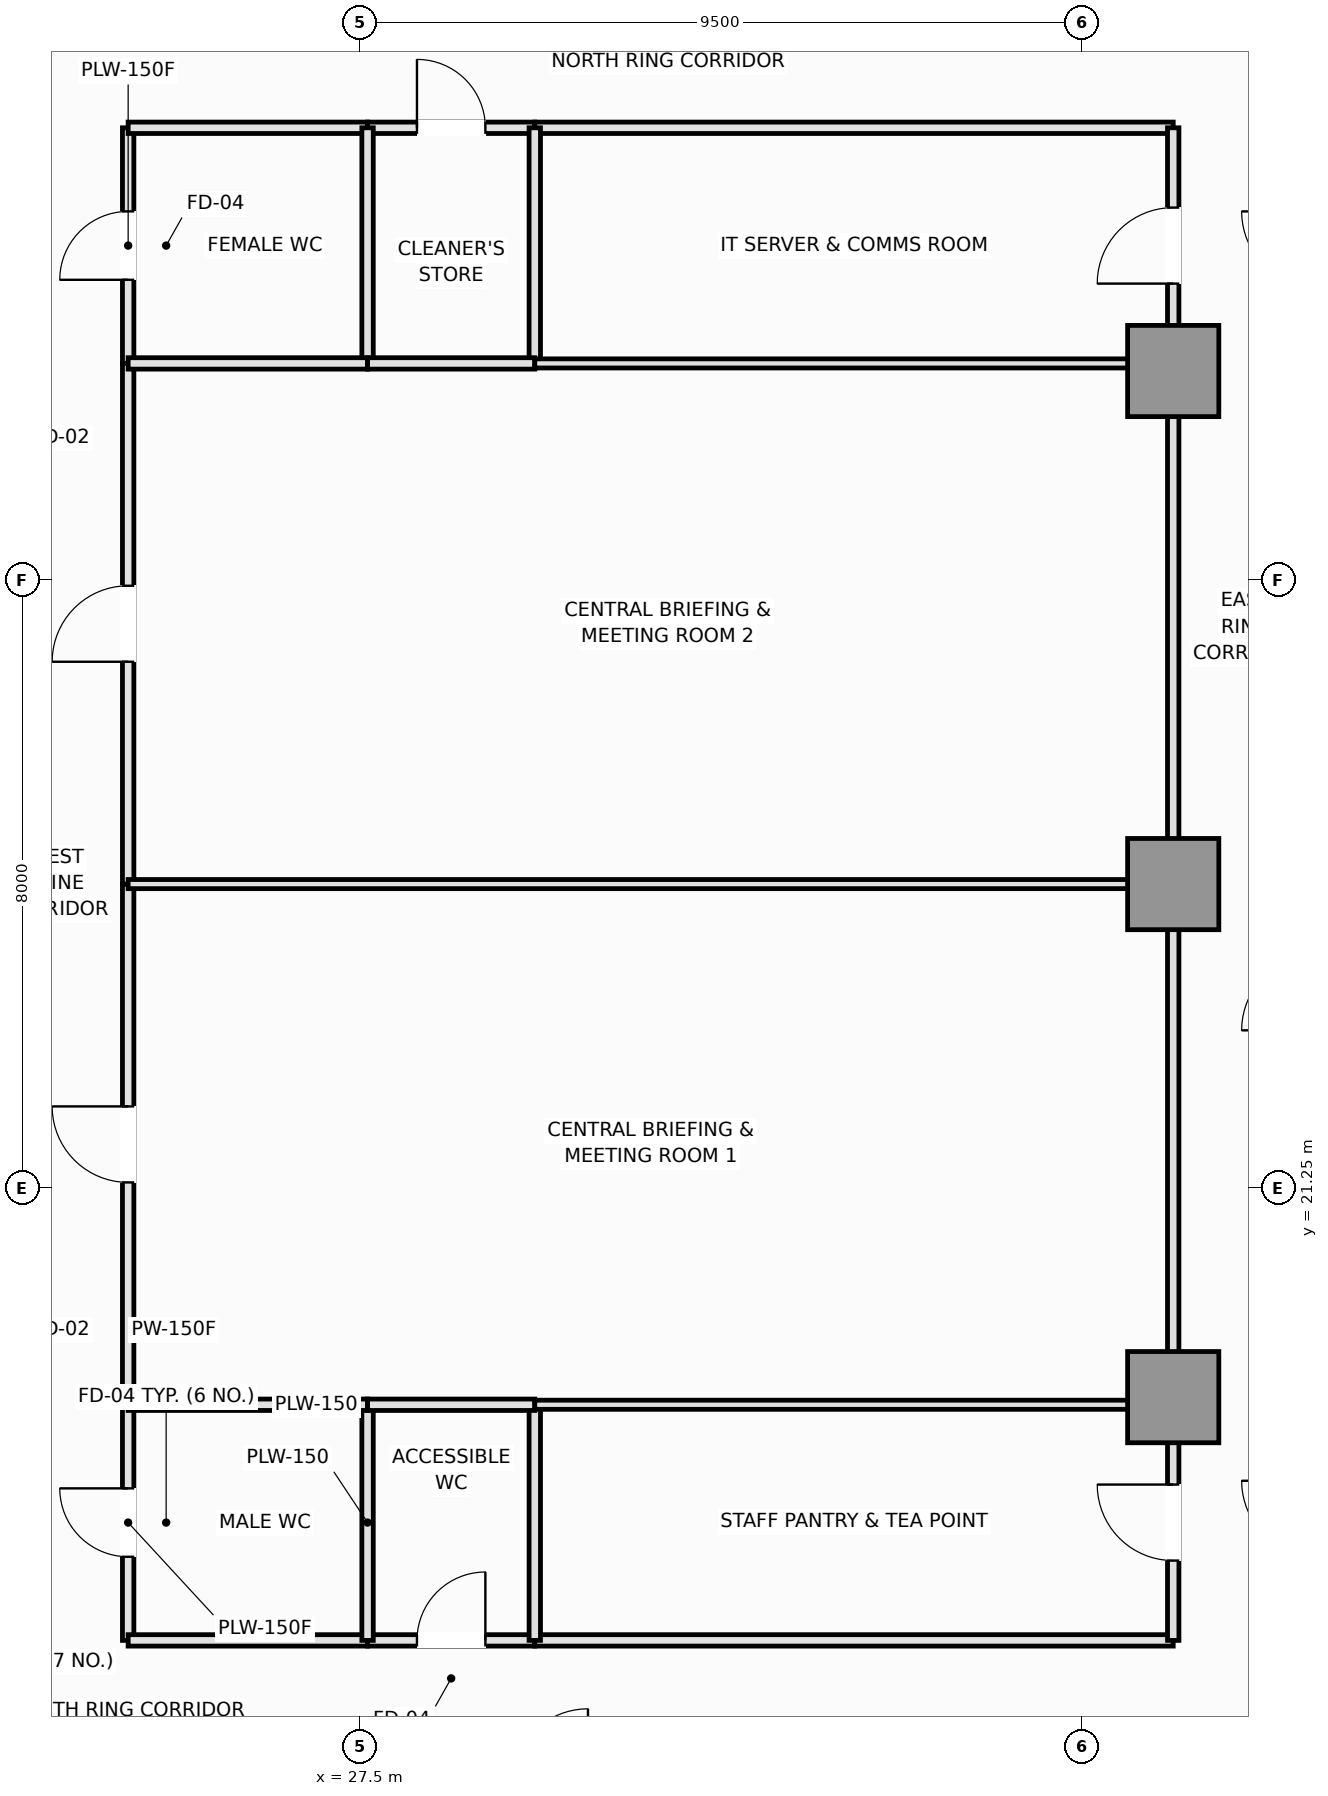
"""IFC4 building model, lengths in metres.
Left out: names, types, materials, properties, quantities, classifications, styles, units other than length and angle.
Written with IfcOpenShell. Run it as: python <this file> out.ifc"""

import sys

from ifc_helpers import new_model, si_unit, direction, frame, frame_2d, origin, origin_2d, place, context, subcontext, project, spatial, rectangle, extrude, element, fill, save


model = new_model("IFC4")
c1 = context("Model", 3, precision=1e-05, world=origin(), true_north=direction((0.0, 1.0)))
c2 = subcontext(c1, "Body", "Model", "MODEL_VIEW")
j1 = project(units=[si_unit("LENGTHUNIT", "METRE"), si_unit("PLANEANGLEUNIT", "RADIAN")], contexts=[c1])
p1 = place(None, origin())
s1 = spatial("IfcSite", under=j1, at=p1, CompositionType="ELEMENT")
p2 = place(p1, origin())
s2 = spatial("IfcBuilding", under=s1, at=p2, CompositionType="ELEMENT")
p3 = place(p2, frame((0.0, 0.0, 46.9)))
s3 = spatial("IfcBuildingStorey", under=s2, at=p3, CompositionType="ELEMENT", Elevation=46.9)
for number, where, z_axis, x_axis in (
    (1, (38.2, 18.5, 0.0), (0.0, 0.0, 1.0), (1.0, 0.0, 0.0)),
    (2, (38.2, 25.25, 0.0), (0.0, 0.0, 1.0), (1.0, 0.0, 0.0)),
    (3, (38.2, 32.0, 0.0), (0.0, 0.0, 1.0), (1.0, 0.0, 0.0)),
):
    element("IfcColumn", number, at=place(p3, frame(where, z_axis=z_axis, x_axis=x_axis)), inside=s3, PredefinedType="COLUMN", context=c2, shape_type="SweptSolid", body=[
        extrude(rectangle(XDim=1.2, YDim=1.2, at=origin_2d()), origin(), (0.0, 0.0, 1.0), 3.55),
    ])
p4 = place(p3, frame((24.45, 15.3, 0.0), z_axis=(0.0, 0.0, 1.0), x_axis=(0.0, 1.0, 0.0)))
e4 = element("IfcWall", 4, at=p4, inside=s3, PredefinedType="PLUMBINGWALL", context=c2, shape_type="SweptSolid", body=[
    extrude(rectangle(XDim=3.1, YDim=0.15, at=frame_2d((1.55, 0.0))), origin(), (0.0, 0.0, 1.0), 3.37),
])
p5 = place(p4, frame((1.1, 0.0, 0.0)))
e5 = element("IfcOpeningElement", 5, at=p5, cuts=e4, PredefinedType="OPENING", context=c2, shape_type="SweptSolid", body=[
    extrude(rectangle(XDim=0.9, YDim=2.1, at=frame_2d((0.45, 1.05))), frame((0.0, 0.085, 0.0), z_axis=(0.0, -1.0, 0.0), x_axis=(1.0, 0.0, 0.0)), (0.0, 0.0, 1.0), 0.17),
])
p6 = place(p3, frame((24.45, 32.1, 0.0), z_axis=(0.0, 0.0, 1.0), x_axis=(0.0, 1.0, 0.0)))
e6 = element("IfcWall", 6, at=p6, inside=s3, PredefinedType="PLUMBINGWALL", context=c2, shape_type="SweptSolid", body=[
    extrude(rectangle(XDim=3.1, YDim=0.15, at=frame_2d((1.55, 0.0))), origin(), (0.0, 0.0, 1.0), 3.37),
])
p7 = place(p6, frame((1.1, 0.0, 0.0)))
e7 = element("IfcOpeningElement", 7, at=p7, cuts=e6, PredefinedType="OPENING", context=c2, shape_type="SweptSolid", body=[
    extrude(rectangle(XDim=0.9, YDim=2.1, at=frame_2d((0.45, 1.05))), frame((0.0, 0.085, 0.0), z_axis=(0.0, -1.0, 0.0), x_axis=(1.0, 0.0, 0.0)), (0.0, 0.0, 1.0), 0.17),
])
p8 = place(p3, frame((24.45, 18.4, 0.0), z_axis=(0.0, 0.0, 1.0), x_axis=(0.0, 1.0, 0.0)))
e8 = element("IfcWall", 8, at=p8, inside=s3, PredefinedType="PARTITIONING", context=c2, shape_type="SweptSolid", body=[
    extrude(rectangle(XDim=6.85, YDim=0.15, at=frame_2d((3.425, 0.0))), origin(), (0.0, 0.0, 1.0), 3.37),
])
p9 = place(p8, frame((2.925, 0.0, 0.0)))
e9 = element("IfcOpeningElement", 9, at=p9, cuts=e8, PredefinedType="OPENING", context=c2, shape_type="SweptSolid", body=[
    extrude(rectangle(XDim=1.0, YDim=2.15, at=frame_2d((0.5, 1.075))), frame((0.0, 0.085, 0.0), z_axis=(0.0, -1.0, 0.0), x_axis=(1.0, 0.0, 0.0)), (0.0, 0.0, 1.0), 0.17),
])
p10 = place(p3, frame((24.45, 25.25, 0.0), z_axis=(0.0, 0.0, 1.0), x_axis=(0.0, 1.0, 0.0)))
e10 = element("IfcWall", 10, at=p10, inside=s3, PredefinedType="PARTITIONING", context=c2, shape_type="SweptSolid", body=[
    extrude(rectangle(XDim=6.85, YDim=0.15, at=frame_2d((3.425, 0.0))), origin(), (0.0, 0.0, 1.0), 3.37),
])
p11 = place(p10, frame((2.925, 0.0, 0.0)))
e11 = element("IfcOpeningElement", 11, at=p11, cuts=e10, PredefinedType="OPENING", context=c2, shape_type="SweptSolid", body=[
    extrude(rectangle(XDim=1.0, YDim=2.15, at=frame_2d((0.5, 1.075))), frame((0.0, 0.085, 0.0), z_axis=(0.0, -1.0, 0.0), x_axis=(1.0, 0.0, 0.0)), (0.0, 0.0, 1.0), 0.17),
])
p12 = place(p3, frame((24.45, 15.3, 0.0), z_axis=(0.0, 0.0, 1.0), x_axis=(1.0, 0.0, 0.0)))
e12 = element("IfcWall", 12, at=p12, inside=s3, PredefinedType="PLUMBINGWALL", context=c2, shape_type="SweptSolid", body=[
    extrude(rectangle(XDim=3.15, YDim=0.15, at=frame_2d((1.575, 0.0))), origin(), (0.0, 0.0, 1.0), 3.37),
])
p13 = place(p3, frame((27.6, 15.3, 0.0), z_axis=(0.0, 0.0, 1.0), x_axis=(1.0, 0.0, 0.0)))
e13 = element("IfcWall", 13, at=p13, inside=s3, PredefinedType="PLUMBINGWALL", context=c2, shape_type="SweptSolid", body=[
    extrude(rectangle(XDim=2.2, YDim=0.15, at=frame_2d((1.1, 0.0))), origin(), (0.0, 0.0, 1.0), 3.37),
])
p14 = place(p13, frame((0.65, 0.0, 0.0)))
e14 = element("IfcOpeningElement", 14, at=p14, cuts=e13, PredefinedType="OPENING", context=c2, shape_type="SweptSolid", body=[
    extrude(rectangle(XDim=0.9, YDim=2.1, at=frame_2d((0.45, 1.05))), frame((0.0, 0.085, 0.0), z_axis=(0.0, -1.0, 0.0), x_axis=(1.0, 0.0, 0.0)), (0.0, 0.0, 1.0), 0.17),
])
p15 = place(p3, frame((29.8, 15.3, 0.0), z_axis=(0.0, 0.0, 1.0), x_axis=(1.0, 0.0, 0.0)))
e15 = element("IfcWall", 15, at=p15, inside=s3, PredefinedType="PARTITIONING", context=c2, shape_type="SweptSolid", body=[
    extrude(rectangle(XDim=8.4, YDim=0.15, at=frame_2d((4.2, 0.0))), origin(), (0.0, 0.0, 1.0), 3.37),
])
p16 = place(p3, frame((24.45, 35.2, 0.0), z_axis=(0.0, 0.0, 1.0), x_axis=(1.0, 0.0, 0.0)))
e16 = element("IfcWall", 16, at=p16, inside=s3, PredefinedType="PLUMBINGWALL", context=c2, shape_type="SweptSolid", body=[
    extrude(rectangle(XDim=3.15, YDim=0.15, at=frame_2d((1.575, 0.0))), origin(), (0.0, 0.0, 1.0), 3.37),
])
p17 = place(p3, frame((27.6, 35.2, 0.0), z_axis=(0.0, 0.0, 1.0), x_axis=(1.0, 0.0, 0.0)))
e17 = element("IfcWall", 17, at=p17, inside=s3, PredefinedType="PLUMBINGWALL", context=c2, shape_type="SweptSolid", body=[
    extrude(rectangle(XDim=2.2, YDim=0.15, at=frame_2d((1.1, 0.0))), origin(), (0.0, 0.0, 1.0), 3.37),
])
p18 = place(p17, frame((0.65, 0.0, 0.0)))
e18 = element("IfcOpeningElement", 18, at=p18, cuts=e17, PredefinedType="OPENING", context=c2, shape_type="SweptSolid", body=[
    extrude(rectangle(XDim=0.9, YDim=2.1, at=frame_2d((0.45, 1.05))), frame((0.0, 0.085, 0.0), z_axis=(0.0, -1.0, 0.0), x_axis=(1.0, 0.0, 0.0)), (0.0, 0.0, 1.0), 0.17),
])
p19 = place(p3, frame((29.8, 35.2, 0.0), z_axis=(0.0, 0.0, 1.0), x_axis=(1.0, 0.0, 0.0)))
e19 = element("IfcWall", 19, at=p19, inside=s3, PredefinedType="PARTITIONING", context=c2, shape_type="SweptSolid", body=[
    extrude(rectangle(XDim=8.4, YDim=0.15, at=frame_2d((4.2, 0.0))), origin(), (0.0, 0.0, 1.0), 3.37),
])
p20 = place(p3, frame((38.2, 15.3, 0.0), z_axis=(0.0, 0.0, 1.0), x_axis=(0.0, 1.0, 0.0)))
e20 = element("IfcWall", 20, at=p20, inside=s3, PredefinedType="PARTITIONING", context=c2, shape_type="SweptSolid", body=[
    extrude(rectangle(XDim=3.1, YDim=0.15, at=frame_2d((1.55, 0.0))), origin(), (0.0, 0.0, 1.0), 2.82),
])
p21 = place(p20, frame((1.05, 0.0, 0.0)))
e21 = element("IfcOpeningElement", 21, at=p21, cuts=e20, PredefinedType="OPENING", context=c2, shape_type="SweptSolid", body=[
    extrude(rectangle(XDim=1.0, YDim=2.15, at=frame_2d((0.5, 1.075))), frame((0.0, 0.085, 0.0), z_axis=(0.0, -1.0, 0.0), x_axis=(1.0, 0.0, 0.0)), (0.0, 0.0, 1.0), 0.17),
])
p22 = place(p3, frame((38.2, 32.1, 0.0), z_axis=(0.0, 0.0, 1.0), x_axis=(0.0, 1.0, 0.0)))
e22 = element("IfcWall", 22, at=p22, inside=s3, PredefinedType="PARTITIONING", context=c2, shape_type="SweptSolid", body=[
    extrude(rectangle(XDim=3.1, YDim=0.15, at=frame_2d((1.55, 0.0))), origin(), (0.0, 0.0, 1.0), 2.82),
])
p23 = place(p22, frame((1.05, 0.0, 0.0)))
e23 = element("IfcOpeningElement", 23, at=p23, cuts=e22, PredefinedType="OPENING", context=c2, shape_type="SweptSolid", body=[
    extrude(rectangle(XDim=1.0, YDim=2.15, at=frame_2d((0.5, 1.075))), frame((0.0, 0.085, 0.0), z_axis=(0.0, -1.0, 0.0), x_axis=(1.0, 0.0, 0.0)), (0.0, 0.0, 1.0), 0.17),
])
for number, where, z_axis, x_axis in (
    (24, (38.2, 18.4, 0.0), (0.0, 0.0, 1.0), (0.0, 1.0, 0.0)),
    (25, (38.2, 25.25, 0.0), (0.0, 0.0, 1.0), (0.0, 1.0, 0.0)),
):
    element("IfcWall", number, at=place(p3, frame(where, z_axis=z_axis, x_axis=x_axis)), inside=s3, PredefinedType="PARTITIONING", context=c2, shape_type="SweptSolid", body=[
        extrude(rectangle(XDim=6.85, YDim=0.15, at=frame_2d((3.425, 0.0))), origin(), (0.0, 0.0, 1.0), 2.82),
    ])
p24 = place(p3, frame((27.6, 15.3, 0.0), z_axis=(0.0, 0.0, 1.0), x_axis=(0.0, 1.0, 0.0)))
e26 = element("IfcWall", 26, at=p24, inside=s3, PredefinedType="PLUMBINGWALL", context=c2, shape_type="SweptSolid", body=[
    extrude(rectangle(XDim=3.1, YDim=0.15, at=frame_2d((1.55, 0.0))), origin(), (0.0, 0.0, 1.0), 3.37),
])
p25 = place(p3, frame((24.45, 18.4, 0.0), z_axis=(0.0, 0.0, 1.0), x_axis=(1.0, 0.0, 0.0)))
e27 = element("IfcWall", 27, at=p25, inside=s3, PredefinedType="PLUMBINGWALL", context=c2, shape_type="SweptSolid", body=[
    extrude(rectangle(XDim=3.15, YDim=0.15, at=frame_2d((1.575, 0.0))), origin(), (0.0, 0.0, 1.0), 2.72),
])
p26 = place(p3, frame((27.6, 32.1, 0.0), z_axis=(0.0, 0.0, 1.0), x_axis=(0.0, 1.0, 0.0)))
e28 = element("IfcWall", 28, at=p26, inside=s3, PredefinedType="PLUMBINGWALL", context=c2, shape_type="SweptSolid", body=[
    extrude(rectangle(XDim=3.1, YDim=0.15, at=frame_2d((1.55, 0.0))), origin(), (0.0, 0.0, 1.0), 3.37),
])
p27 = place(p3, frame((24.45, 32.1, 0.0), z_axis=(0.0, 0.0, 1.0), x_axis=(1.0, 0.0, 0.0)))
e29 = element("IfcWall", 29, at=p27, inside=s3, PredefinedType="PLUMBINGWALL", context=c2, shape_type="SweptSolid", body=[
    extrude(rectangle(XDim=3.15, YDim=0.15, at=frame_2d((1.575, 0.0))), origin(), (0.0, 0.0, 1.0), 2.72),
])
p28 = place(p3, frame((29.8, 15.3, 0.0), z_axis=(0.0, 0.0, 1.0), x_axis=(0.0, 1.0, 0.0)))
e30 = element("IfcWall", 30, at=p28, inside=s3, PredefinedType="PLUMBINGWALL", context=c2, shape_type="SweptSolid", body=[
    extrude(rectangle(XDim=3.1, YDim=0.15, at=frame_2d((1.55, 0.0))), origin(), (0.0, 0.0, 1.0), 3.37),
])
p29 = place(p3, frame((27.6, 18.4, 0.0), z_axis=(0.0, 0.0, 1.0), x_axis=(1.0, 0.0, 0.0)))
e31 = element("IfcWall", 31, at=p29, inside=s3, PredefinedType="PLUMBINGWALL", context=c2, shape_type="SweptSolid", body=[
    extrude(rectangle(XDim=2.2, YDim=0.15, at=frame_2d((1.1, 0.0))), origin(), (0.0, 0.0, 1.0), 2.72),
])
p30 = place(p3, frame((29.8, 32.1, 0.0), z_axis=(0.0, 0.0, 1.0), x_axis=(0.0, 1.0, 0.0)))
e32 = element("IfcWall", 32, at=p30, inside=s3, PredefinedType="PLUMBINGWALL", context=c2, shape_type="SweptSolid", body=[
    extrude(rectangle(XDim=3.1, YDim=0.15, at=frame_2d((1.55, 0.0))), origin(), (0.0, 0.0, 1.0), 3.37),
])
p31 = place(p3, frame((27.6, 32.1, 0.0), z_axis=(0.0, 0.0, 1.0), x_axis=(1.0, 0.0, 0.0)))
e33 = element("IfcWall", 33, at=p31, inside=s3, PredefinedType="PLUMBINGWALL", context=c2, shape_type="SweptSolid", body=[
    extrude(rectangle(XDim=2.2, YDim=0.15, at=frame_2d((1.1, 0.0))), origin(), (0.0, 0.0, 1.0), 2.72),
])
for number, where, z_axis, x_axis in (
    (34, (29.8, 18.4, 0.0), (0.0, 0.0, 1.0), (1.0, 0.0, 0.0)),
    (35, (29.8, 32.1, 0.0), (0.0, 0.0, 1.0), (1.0, 0.0, 0.0)),
):
    element("IfcWall", number, at=place(p3, frame(where, z_axis=z_axis, x_axis=x_axis)), inside=s3, PredefinedType="PARTITIONING", context=c2, shape_type="SweptSolid", body=[
        extrude(rectangle(XDim=8.4, YDim=0.12, at=frame_2d((4.2, 0.0))), origin(), (0.0, 0.0, 1.0), 2.72),
    ])
p32 = place(p3, frame((24.45, 25.25, 0.0), z_axis=(0.0, 0.0, 1.0), x_axis=(1.0, 0.0, 0.0)))
e36 = element("IfcWall", 36, at=p32, inside=s3, PredefinedType="PARTITIONING", context=c2, shape_type="SweptSolid", body=[
    extrude(rectangle(XDim=13.75, YDim=0.12, at=frame_2d((6.875, 0.0))), origin(), (0.0, 0.0, 1.0), 2.72),
])
p33 = place(p5, origin())
e37 = element("IfcDoor", 37, at=p33, inside=s3, OperationType="SINGLE_SWING_RIGHT", PredefinedType="DOOR", context=c2, shape_type="SweptSolid", body=[
    extrude(rectangle(XDim=0.9, YDim=2.1, at=frame_2d((0.45, 1.05))), frame((0.0, 0.025, 0.0), z_axis=(0.0, -1.0, 0.0), x_axis=(1.0, 0.0, 0.0)), (0.0, 0.0, 1.0), 0.05),
])
fill(e5, e37)
p34 = place(p7, origin())
e38 = element("IfcDoor", 38, at=p34, inside=s3, OperationType="SINGLE_SWING_LEFT", PredefinedType="DOOR", context=c2, shape_type="SweptSolid", body=[
    extrude(rectangle(XDim=0.9, YDim=2.1, at=frame_2d((0.45, 1.05))), frame((0.0, 0.025, 0.0), z_axis=(0.0, -1.0, 0.0), x_axis=(1.0, 0.0, 0.0)), (0.0, 0.0, 1.0), 0.05),
])
fill(e7, e38)
p35 = place(p9, origin())
e39 = element("IfcDoor", 39, at=p35, inside=s3, OperationType="SINGLE_SWING_RIGHT", PredefinedType="DOOR", context=c2, shape_type="SweptSolid", body=[
    extrude(rectangle(XDim=1.0, YDim=2.15, at=frame_2d((0.5, 1.075))), frame((0.0, 0.025, 0.0), z_axis=(0.0, -1.0, 0.0), x_axis=(1.0, 0.0, 0.0)), (0.0, 0.0, 1.0), 0.05),
])
fill(e9, e39)
p36 = place(p11, origin())
e40 = element("IfcDoor", 40, at=p36, inside=s3, OperationType="SINGLE_SWING_LEFT", PredefinedType="DOOR", context=c2, shape_type="SweptSolid", body=[
    extrude(rectangle(XDim=1.0, YDim=2.15, at=frame_2d((0.5, 1.075))), frame((0.0, 0.025, 0.0), z_axis=(0.0, -1.0, 0.0), x_axis=(1.0, 0.0, 0.0)), (0.0, 0.0, 1.0), 0.05),
])
fill(e11, e40)
p37 = place(p14, origin())
e41 = element("IfcDoor", 41, at=p37, inside=s3, OperationType="SINGLE_SWING_RIGHT", PredefinedType="DOOR", context=c2, shape_type="SweptSolid", body=[
    extrude(rectangle(XDim=0.9, YDim=2.1, at=frame_2d((0.45, 1.05))), frame((0.0, 0.025, 0.0), z_axis=(0.0, -1.0, 0.0), x_axis=(1.0, 0.0, 0.0)), (0.0, 0.0, 1.0), 0.05),
])
fill(e14, e41)
p38 = place(p18, origin())
e42 = element("IfcDoor", 42, at=p38, inside=s3, OperationType="SINGLE_SWING_LEFT", PredefinedType="DOOR", context=c2, shape_type="SweptSolid", body=[
    extrude(rectangle(XDim=0.9, YDim=2.1, at=frame_2d((0.45, 1.05))), frame((0.0, 0.025, 0.0), z_axis=(0.0, -1.0, 0.0), x_axis=(1.0, 0.0, 0.0)), (0.0, 0.0, 1.0), 0.05),
])
fill(e18, e42)
p39 = place(p21, origin())
e43 = element("IfcDoor", 43, at=p39, inside=s3, OperationType="SINGLE_SWING_RIGHT", PredefinedType="DOOR", context=c2, shape_type="SweptSolid", body=[
    extrude(rectangle(XDim=1.0, YDim=2.15, at=frame_2d((0.5, 1.075))), frame((0.0, 0.025, 0.0), z_axis=(0.0, -1.0, 0.0), x_axis=(1.0, 0.0, 0.0)), (0.0, 0.0, 1.0), 0.05),
])
fill(e21, e43)
p40 = place(p23, origin())
e44 = element("IfcDoor", 44, at=p40, inside=s3, OperationType="SINGLE_SWING_LEFT", PredefinedType="DOOR", context=c2, shape_type="SweptSolid", body=[
    extrude(rectangle(XDim=1.0, YDim=2.15, at=frame_2d((0.5, 1.075))), frame((0.0, 0.025, 0.0), z_axis=(0.0, -1.0, 0.0), x_axis=(1.0, 0.0, 0.0)), (0.0, 0.0, 1.0), 0.05),
])
fill(e23, e44)
save(model, sys.argv[1])
